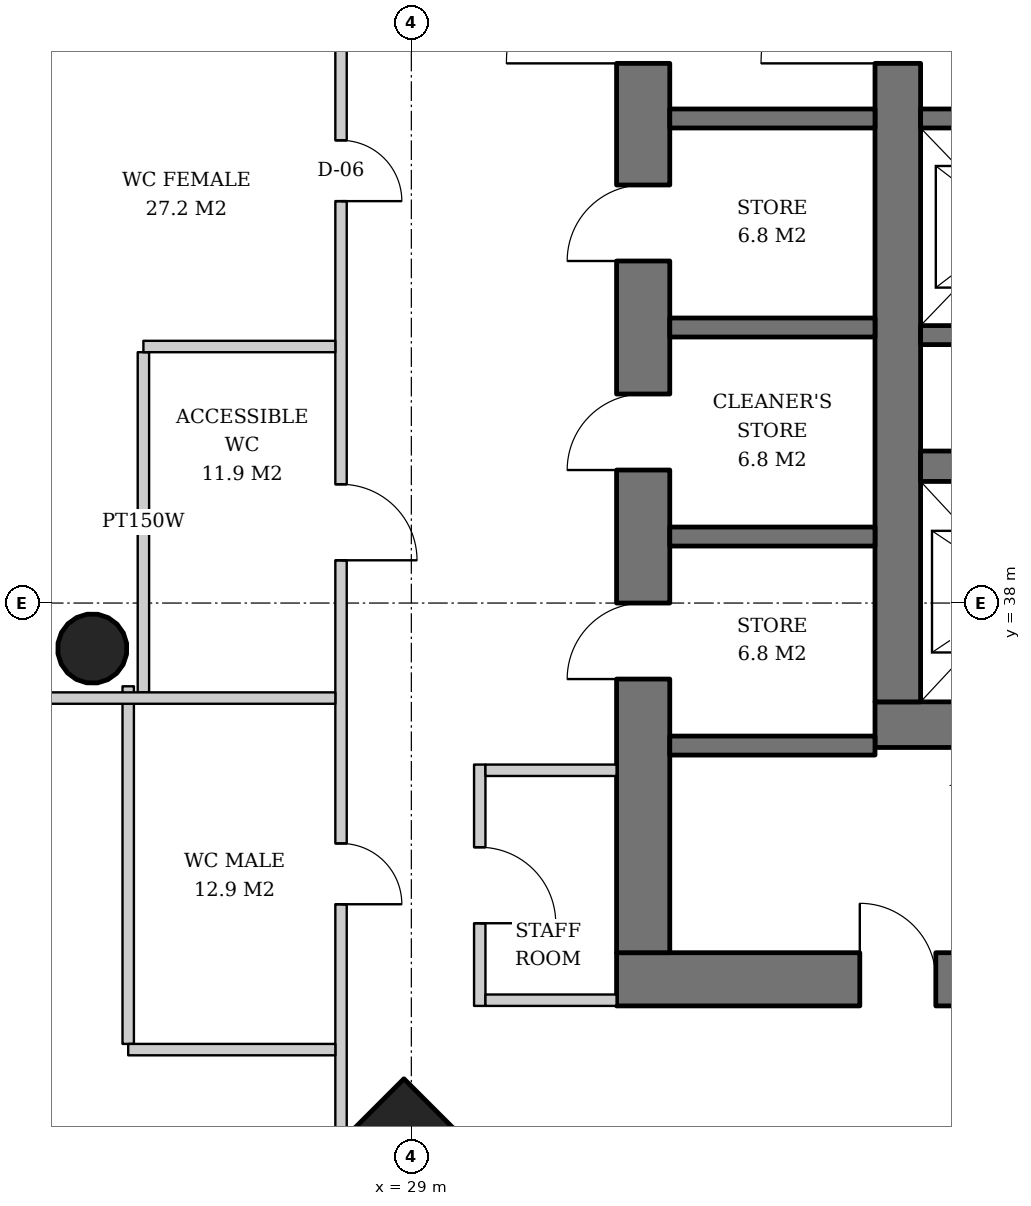
"""IFC4 building model, lengths in metres.
Left out: names, types, materials, properties, quantities, classifications, styles, units other than length and angle.
Written with IfcOpenShell. Run it as: python <this file> out.ifc"""

import sys

from ifc_helpers import new_model, si_unit, direction, frame, frame_2d, origin, origin_2d, place, context, subcontext, project, spatial, rectangle, hollow_circle, extrude, element, fill, save


model = new_model("IFC4")
c1 = context("Model", 3, precision=1e-05, world=origin(), true_north=direction((0.0, 1.0)))
c2 = subcontext(c1, "Body", "Model", "MODEL_VIEW")
j1 = project(units=[si_unit("LENGTHUNIT", "METRE"), si_unit("PLANEANGLEUNIT", "RADIAN")], contexts=[c1])
p1 = place(None, origin())
s1 = spatial("IfcSite", under=j1, at=p1, CompositionType="ELEMENT")
p2 = place(p1, origin())
s2 = spatial("IfcBuilding", under=s1, at=p2, CompositionType="ELEMENT")
p3 = place(p2, frame((0.0, 0.0, 138.8)))
s3 = spatial("IfcBuildingStorey", under=s2, at=p3, CompositionType="ELEMENT", Elevation=138.8)
p4 = place(p3, frame((28.864, 29.864, 0.0), z_axis=(0.031898107953, 0.031898107953, 0.998981992539), x_axis=(-0.707106781187, 0.707106781187, 0.0)))
e1 = element("IfcColumn", 1, at=p4, inside=s3, PredefinedType="COLUMN", context=c2, shape_type="SweptSolid", body=[
    extrude(rectangle(XDim=2.6, YDim=2.6, at=origin_2d()), origin(), (0.0, 0.0, 1.0), 3.804),
])
p5 = place(p3, frame((24.764, 37.382, 0.0), z_axis=(0.031910269556, 0.015987237665, 0.999362868496), x_axis=(-0.447933021895, 0.894067115991, 0.0)))
e2 = element("IfcColumn", 2, at=p5, inside=s3, PredefinedType="COLUMN", context=c2, shape_type="SweptSolid", body=[
    extrude(hollow_circle(Radius=0.457, WallThickness=0.03, at=origin_2d()), origin(), (0.0, 0.0, 1.0), 3.802),
])
p6 = place(p3, frame((35.1, 36.4, 0.0), z_axis=(0.0, 0.0, 1.0), x_axis=(1.0, 0.0, 0.0)))
e3 = element("IfcWall", 3, at=p6, inside=s3, PredefinedType="SHEAR", context=c2, shape_type="SweptSolid", body=[
    extrude(rectangle(XDim=19.8, YDim=0.6, at=frame_2d((9.9, 0.0))), origin(), (0.0, 0.0, 1.0), 3.8),
])
p7 = place(p6, frame((3.9, 0.0, 0.0)))
e4 = element("IfcOpeningElement", 4, at=p7, cuts=e3, PredefinedType="OPENING", context=c2, shape_type="SweptSolid", body=[
    extrude(rectangle(XDim=1.0, YDim=2.1, at=frame_2d((0.5, 1.05))), frame((0.0, 0.31, 0.0), z_axis=(0.0, -1.0, 0.0), x_axis=(1.0, 0.0, 0.0)), (0.0, 0.0, 1.0), 0.62),
])
p8 = place(p6, frame((15.35, 0.0, 0.0)))
e5 = element("IfcOpeningElement", 5, at=p8, cuts=e3, PredefinedType="OPENING", context=c2, shape_type="SweptSolid", body=[
    extrude(rectangle(XDim=1.0, YDim=2.1, at=frame_2d((0.5, 1.05))), frame((0.0, 0.31, 0.0), z_axis=(0.0, -1.0, 0.0), x_axis=(1.0, 0.0, 0.0)), (0.0, 0.0, 1.0), 0.62),
])
p9 = place(p3, frame((35.4, 36.7, 0.0), z_axis=(0.0, 0.0, 1.0), x_axis=(0.0, 1.0, 0.0)))
e6 = element("IfcWall", 6, at=p9, inside=s3, PredefinedType="SHEAR", context=c2, shape_type="SweptSolid", body=[
    extrude(rectangle(XDim=18.6, YDim=0.6, at=frame_2d((9.3, 0.0))), origin(), (0.0, 0.0, 1.0), 3.8),
])
p10 = place(p9, frame((8.4, 0.0, 0.0)))
e7 = element("IfcOpeningElement", 7, at=p10, cuts=e6, PredefinedType="OPENING", context=c2, shape_type="SweptSolid", body=[
    extrude(rectangle(XDim=1.8, YDim=2.4, at=frame_2d((0.9, 1.2))), frame((0.0, 0.31, 0.0), z_axis=(0.0, -1.0, 0.0), x_axis=(1.0, 0.0, 0.0)), (0.0, 0.0, 1.0), 0.62),
])
p11 = place(p3, frame((31.7, 33.05, 0.0), z_axis=(0.0, 0.0, 1.0), x_axis=(1.0, 0.0, 0.0)))
e8 = element("IfcWall", 8, at=p11, inside=s3, PredefinedType="SHEAR", context=c2, shape_type="SweptSolid", body=[
    extrude(rectangle(XDim=26.6, YDim=0.7, at=frame_2d((13.3, 0.0))), origin(), (0.0, 0.0, 1.0), 3.8),
])
p12 = place(p11, frame((7.3, 0.0, 0.0)))
e9 = element("IfcOpeningElement", 9, at=p12, cuts=e8, PredefinedType="OPENING", context=c2, shape_type="SweptSolid", body=[
    extrude(rectangle(XDim=1.0, YDim=2.1, at=frame_2d((0.5, 1.05))), frame((0.0, 0.36, 0.0), z_axis=(0.0, -1.0, 0.0), x_axis=(1.0, 0.0, 0.0)), (0.0, 0.0, 1.0), 0.72),
])
p13 = place(p11, frame((18.75, 0.0, 0.0)))
e10 = element("IfcOpeningElement", 10, at=p13, cuts=e8, PredefinedType="OPENING", context=c2, shape_type="SweptSolid", body=[
    extrude(rectangle(XDim=1.0, YDim=2.1, at=frame_2d((0.5, 1.05))), frame((0.0, 0.36, 0.0), z_axis=(0.0, -1.0, 0.0), x_axis=(1.0, 0.0, 0.0)), (0.0, 0.0, 1.0), 0.72),
])
p14 = place(p11, frame((3.2, 0.0, 0.0)))
e11 = element("IfcOpeningElement", 11, at=p14, cuts=e8, PredefinedType="OPENING", context=c2, shape_type="SweptSolid", body=[
    extrude(rectangle(XDim=1.0, YDim=2.1, at=frame_2d((0.5, 1.05))), frame((0.0, 0.36, 0.0), z_axis=(0.0, -1.0, 0.0), x_axis=(1.0, 0.0, 0.0)), (0.0, 0.0, 1.0), 0.72),
])
p15 = place(p11, frame((10.42, 0.0, 0.0)))
e12 = element("IfcOpeningElement", 12, at=p15, cuts=e8, PredefinedType="OPENING", context=c2, shape_type="SweptSolid", body=[
    extrude(rectangle(XDim=1.0, YDim=2.1, at=frame_2d((0.5, 1.05))), frame((0.0, 0.36, 0.0), z_axis=(0.0, -1.0, 0.0), x_axis=(1.0, 0.0, 0.0)), (0.0, 0.0, 1.0), 0.72),
])
p16 = place(p11, frame((14.46, 0.0, 0.0)))
e13 = element("IfcOpeningElement", 13, at=p16, cuts=e8, PredefinedType="OPENING", context=c2, shape_type="SweptSolid", body=[
    extrude(rectangle(XDim=1.0, YDim=2.1, at=frame_2d((0.5, 1.05))), frame((0.0, 0.36, 0.0), z_axis=(0.0, -1.0, 0.0), x_axis=(1.0, 0.0, 0.0)), (0.0, 0.0, 1.0), 0.72),
])
p17 = place(p11, frame((22.5, 0.0, 0.0)))
e14 = element("IfcOpeningElement", 14, at=p17, cuts=e8, PredefinedType="OPENING", context=c2, shape_type="SweptSolid", body=[
    extrude(rectangle(XDim=1.0, YDim=2.1, at=frame_2d((0.5, 1.05))), frame((0.0, 0.36, 0.0), z_axis=(0.0, -1.0, 0.0), x_axis=(1.0, 0.0, 0.0)), (0.0, 0.0, 1.0), 0.72),
])
p18 = place(p3, frame((32.05, 33.4, 0.0), z_axis=(0.0, 0.0, 1.0), x_axis=(0.0, 1.0, 0.0)))
e15 = element("IfcWall", 15, at=p18, inside=s3, PredefinedType="SHEAR", context=c2, shape_type="SweptSolid", body=[
    extrude(rectangle(XDim=25.2, YDim=0.7, at=frame_2d((12.6, 0.0))), origin(), (0.0, 0.0, 1.0), 3.8),
])
p19 = place(p18, frame((11.7, 0.0, 0.0)))
e16 = element("IfcOpeningElement", 16, at=p19, cuts=e15, PredefinedType="OPENING", context=c2, shape_type="SweptSolid", body=[
    extrude(rectangle(XDim=1.8, YDim=2.4, at=frame_2d((0.9, 1.2))), frame((0.0, 0.36, 0.0), z_axis=(0.0, -1.0, 0.0), x_axis=(1.0, 0.0, 0.0)), (0.0, 0.0, 1.0), 0.72),
])
p20 = place(p18, frame((3.6, 0.0, 0.0)))
e17 = element("IfcOpeningElement", 17, at=p20, cuts=e15, PredefinedType="OPENING", context=c2, shape_type="SweptSolid", body=[
    extrude(rectangle(XDim=1.0, YDim=2.1, at=frame_2d((0.5, 1.05))), frame((0.0, 0.36, 0.0), z_axis=(0.0, -1.0, 0.0), x_axis=(1.0, 0.0, 0.0)), (0.0, 0.0, 1.0), 0.72),
])
p21 = place(p18, frame((6.35, 0.0, 0.0)))
e18 = element("IfcOpeningElement", 18, at=p21, cuts=e15, PredefinedType="OPENING", context=c2, shape_type="SweptSolid", body=[
    extrude(rectangle(XDim=1.0, YDim=2.1, at=frame_2d((0.5, 1.05))), frame((0.0, 0.36, 0.0), z_axis=(0.0, -1.0, 0.0), x_axis=(1.0, 0.0, 0.0)), (0.0, 0.0, 1.0), 0.72),
])
p22 = place(p18, frame((9.1, 0.0, 0.0)))
e19 = element("IfcOpeningElement", 19, at=p22, cuts=e15, PredefinedType="OPENING", context=c2, shape_type="SweptSolid", body=[
    extrude(rectangle(XDim=1.0, YDim=2.1, at=frame_2d((0.5, 1.05))), frame((0.0, 0.36, 0.0), z_axis=(0.0, -1.0, 0.0), x_axis=(1.0, 0.0, 0.0)), (0.0, 0.0, 1.0), 0.72),
])
p23 = place(p18, frame((15.1, 0.0, 0.0)))
e20 = element("IfcOpeningElement", 20, at=p23, cuts=e15, PredefinedType="OPENING", context=c2, shape_type="SweptSolid", body=[
    extrude(rectangle(XDim=1.0, YDim=2.1, at=frame_2d((0.5, 1.05))), frame((0.0, 0.36, 0.0), z_axis=(0.0, -1.0, 0.0), x_axis=(1.0, 0.0, 0.0)), (0.0, 0.0, 1.0), 0.72),
])
p24 = place(p18, frame((17.85, 0.0, 0.0)))
e21 = element("IfcOpeningElement", 21, at=p24, cuts=e15, PredefinedType="OPENING", context=c2, shape_type="SweptSolid", body=[
    extrude(rectangle(XDim=1.0, YDim=2.1, at=frame_2d((0.5, 1.05))), frame((0.0, 0.36, 0.0), z_axis=(0.0, -1.0, 0.0), x_axis=(1.0, 0.0, 0.0)), (0.0, 0.0, 1.0), 0.72),
])
p25 = place(p3, frame((35.7, 39.8, 0.0), z_axis=(0.0, 0.0, 1.0), x_axis=(1.0, 0.0, 0.0)))
e22 = element("IfcWall", 22, at=p25, inside=s3, PredefinedType="SHEAR", context=c2, shape_type="SweptSolid", body=[
    extrude(rectangle(XDim=18.6, YDim=0.4, at=frame_2d((9.3, 0.0))), origin(), (0.0, 0.0, 1.0), 3.8),
])
p26 = place(p3, frame((35.7, 41.525, 0.0), z_axis=(0.0, 0.0, 1.0), x_axis=(1.0, 0.0, 0.0)))
e23 = element("IfcWall", 23, at=p26, inside=s3, PredefinedType="SHEAR", context=c2, shape_type="SweptSolid", body=[
    extrude(rectangle(XDim=11.0, YDim=0.25, at=frame_2d((5.5, 0.0))), origin(), (0.0, 0.0, 1.0), 3.8),
])
p27 = place(p3, frame((35.7, 44.375, 0.0), z_axis=(0.0, 0.0, 1.0), x_axis=(1.0, 0.0, 0.0)))
e24 = element("IfcWall", 24, at=p27, inside=s3, PredefinedType="SHEAR", context=c2, shape_type="SweptSolid", body=[
    extrude(rectangle(XDim=12.83, YDim=0.25, at=frame_2d((6.415, 0.0))), origin(), (0.0, 0.0, 1.0), 3.8),
])
p28 = place(p27, frame((0.7, 0.0, 0.0)))
e25 = element("IfcOpeningElement", 25, at=p28, cuts=e24, PredefinedType="OPENING", context=c2, shape_type="SweptSolid", body=[
    extrude(rectangle(XDim=1.1, YDim=2.2, at=frame_2d((0.55, 1.1))), frame((0.0, 0.135, 0.0), z_axis=(0.0, -1.0, 0.0), x_axis=(1.0, 0.0, 0.0)), (0.0, 0.0, 1.0), 0.27),
])
p29 = place(p27, frame((3.45, 0.0, 0.0)))
e26 = element("IfcOpeningElement", 26, at=p29, cuts=e24, PredefinedType="OPENING", context=c2, shape_type="SweptSolid", body=[
    extrude(rectangle(XDim=1.1, YDim=2.2, at=frame_2d((0.55, 1.1))), frame((0.0, 0.135, 0.0), z_axis=(0.0, -1.0, 0.0), x_axis=(1.0, 0.0, 0.0)), (0.0, 0.0, 1.0), 0.27),
])
p30 = place(p27, frame((6.2, 0.0, 0.0)))
e27 = element("IfcOpeningElement", 27, at=p30, cuts=e24, PredefinedType="OPENING", context=c2, shape_type="SweptSolid", body=[
    extrude(rectangle(XDim=1.1, YDim=2.2, at=frame_2d((0.55, 1.1))), frame((0.0, 0.135, 0.0), z_axis=(0.0, -1.0, 0.0), x_axis=(1.0, 0.0, 0.0)), (0.0, 0.0, 1.0), 0.27),
])
p31 = place(p27, frame((8.95, 0.0, 0.0)))
e28 = element("IfcOpeningElement", 28, at=p31, cuts=e24, PredefinedType="OPENING", context=c2, shape_type="SweptSolid", body=[
    extrude(rectangle(XDim=1.1, YDim=2.2, at=frame_2d((0.55, 1.1))), frame((0.0, 0.135, 0.0), z_axis=(0.0, -1.0, 0.0), x_axis=(1.0, 0.0, 0.0)), (0.0, 0.0, 1.0), 0.27),
])
p32 = place(p27, frame((11.515, 0.0, 0.0)))
e29 = element("IfcOpeningElement", 29, at=p32, cuts=e24, PredefinedType="OPENING", context=c2, shape_type="SweptSolid", body=[
    extrude(rectangle(XDim=0.8, YDim=2.0, at=frame_2d((0.4, 1.0))), frame((0.0, 0.135, 0.0), z_axis=(0.0, -1.0, 0.0), x_axis=(1.0, 0.0, 0.0)), (0.0, 0.0, 1.0), 0.27),
])
for number, where, z_axis, x_axis in (
    (30, (32.4, 36.125, 0.0), (0.0, 0.0, 1.0), (1.0, 0.0, 0.0)),
    (31, (32.4, 38.875, 0.0), (0.0, 0.0, 1.0), (1.0, 0.0, 0.0)),
    (32, (32.4, 41.625, 0.0), (0.0, 0.0, 1.0), (1.0, 0.0, 0.0)),
    (33, (32.4, 44.375, 0.0), (0.0, 0.0, 1.0), (1.0, 0.0, 0.0)),
):
    element("IfcWall", number, at=place(p3, frame(where, z_axis=z_axis, x_axis=x_axis)), inside=s3, PredefinedType="SHEAR", context=c2, shape_type="SweptSolid", body=[
        extrude(rectangle(XDim=2.7, YDim=0.25, at=frame_2d((1.35, 0.0))), origin(), (0.0, 0.0, 1.0), 3.8),
    ])
p33 = place(p3, frame((29.9, 35.875, 0.0), z_axis=(0.0, 0.0, 1.0), x_axis=(0.0, -1.0, 0.0)))
e34 = element("IfcWall", 34, at=p33, inside=s3, PredefinedType="PARTITIONING", context=c2, shape_type="SweptSolid", body=[
    extrude(rectangle(XDim=3.175, YDim=0.15, at=frame_2d((1.587, 0.0))), origin(), (0.0, 0.0, 1.0), 2.806),
])
p34 = place(p33, frame((1.087, 0.0, 0.0)))
e35 = element("IfcOpeningElement", 35, at=p34, cuts=e34, PredefinedType="OPENING", context=c2, shape_type="SweptSolid", body=[
    extrude(rectangle(XDim=1.0, YDim=2.1, at=frame_2d((0.5, 1.05))), frame((0.0, 0.085, 0.0), z_axis=(0.0, -1.0, 0.0), x_axis=(1.0, 0.0, 0.0)), (0.0, 0.0, 1.0), 0.17),
])
for number, where, z_axis, x_axis in (
    (36, (31.7, 35.8, 0.0), (0.0, 0.0, 1.0), (-1.0, 0.0, 0.0)),
    (37, (31.7, 32.775, 0.0), (0.0, 0.0, 1.0), (-1.0, 0.0, 0.0)),
):
    element("IfcWall", number, at=place(p3, frame(where, z_axis=z_axis, x_axis=x_axis)), inside=s3, PredefinedType="PARTITIONING", context=c2, shape_type="SweptSolid", body=[
        extrude(rectangle(XDim=1.725, YDim=0.15, at=frame_2d((0.862, 0.0))), origin(), (0.0, 0.0, 1.0), 3.62),
    ])
p35 = place(p3, frame((25.475, 41.3, 0.0), z_axis=(0.0, 0.0, 1.0), x_axis=(0.0, -1.0, 0.0)))
e38 = element("IfcWall", 38, at=p35, inside=s3, PredefinedType="PARTITIONING", context=c2, shape_type="SweptSolid", body=[
    extrude(rectangle(XDim=4.475, YDim=0.15, at=frame_2d((2.238, 0.0))), origin(), (0.0, 0.0, 1.0), 2.806),
])
p36 = place(p3, frame((25.275, 36.905, 0.0), z_axis=(0.0, 0.0, 1.0), x_axis=(0.0, -1.0, 0.0)))
e39 = element("IfcWall", 39, at=p36, inside=s3, PredefinedType="PARTITIONING", context=c2, shape_type="SweptSolid", body=[
    extrude(rectangle(XDim=4.705, YDim=0.15, at=frame_2d((2.353, 0.0))), origin(), (0.0, 0.0, 1.0), 2.806),
])
p37 = place(p3, frame((28.075, 61.011, 0.0), z_axis=(0.0, 0.0, 1.0), x_axis=(0.0, -1.0, 0.0)))
e40 = element("IfcWall", 40, at=p37, inside=s3, PredefinedType="PARTITIONING", context=c2, shape_type="SweptSolid", body=[
    extrude(rectangle(XDim=30.023, YDim=0.15, at=frame_2d((15.011, 0.0))), origin(), (0.0, 0.0, 1.0), 2.72),
])
p38 = place(p37, frame((2.949, 0.0, 0.0)))
e41 = element("IfcOpeningElement", 41, at=p38, cuts=e40, PredefinedType="OPENING", context=c2, shape_type="SweptSolid", body=[
    extrude(rectangle(XDim=1.0, YDim=2.1, at=frame_2d((0.5, 1.05))), frame((0.0, 0.085, 0.0), z_axis=(0.0, -1.0, 0.0), x_axis=(1.0, 0.0, 0.0)), (0.0, 0.0, 1.0), 0.17),
])
p39 = place(p37, frame((7.574, 0.0, 0.0)))
e42 = element("IfcOpeningElement", 42, at=p39, cuts=e40, PredefinedType="OPENING", context=c2, shape_type="SweptSolid", body=[
    extrude(rectangle(XDim=1.0, YDim=2.1, at=frame_2d((0.5, 1.05))), frame((0.0, 0.085, 0.0), z_axis=(0.0, -1.0, 0.0), x_axis=(1.0, 0.0, 0.0)), (0.0, 0.0, 1.0), 0.17),
])
p40 = place(p37, frame((12.199, 0.0, 0.0)))
e43 = element("IfcOpeningElement", 43, at=p40, cuts=e40, PredefinedType="OPENING", context=c2, shape_type="SweptSolid", body=[
    extrude(rectangle(XDim=1.0, YDim=2.1, at=frame_2d((0.5, 1.05))), frame((0.0, 0.085, 0.0), z_axis=(0.0, -1.0, 0.0), x_axis=(1.0, 0.0, 0.0)), (0.0, 0.0, 1.0), 0.17),
])
p41 = place(p37, frame((16.924, 0.0, 0.0)))
e44 = element("IfcOpeningElement", 44, at=p41, cuts=e40, PredefinedType="OPENING", context=c2, shape_type="SweptSolid", body=[
    extrude(rectangle(XDim=0.8, YDim=2.1, at=frame_2d((0.4, 1.05))), frame((0.0, 0.085, 0.0), z_axis=(0.0, -1.0, 0.0), x_axis=(1.0, 0.0, 0.0)), (0.0, 0.0, 1.0), 0.17),
])
p42 = place(p37, frame((21.449, 0.0, 0.0)))
e45 = element("IfcOpeningElement", 45, at=p42, cuts=e40, PredefinedType="OPENING", context=c2, shape_type="SweptSolid", body=[
    extrude(rectangle(XDim=1.0, YDim=2.1, at=frame_2d((0.5, 1.05))), frame((0.0, 0.085, 0.0), z_axis=(0.0, -1.0, 0.0), x_axis=(1.0, 0.0, 0.0)), (0.0, 0.0, 1.0), 0.17),
])
p43 = place(p37, frame((26.174, 0.0, 0.0)))
e46 = element("IfcOpeningElement", 46, at=p43, cuts=e40, PredefinedType="OPENING", context=c2, shape_type="SweptSolid", body=[
    extrude(rectangle(XDim=0.8, YDim=2.1, at=frame_2d((0.4, 1.05))), frame((0.0, 0.085, 0.0), z_axis=(0.0, -1.0, 0.0), x_axis=(1.0, 0.0, 0.0)), (0.0, 0.0, 1.0), 0.17),
])
p44 = place(p3, frame((28.0, 41.375, 0.0), z_axis=(0.0, 0.0, 1.0), x_axis=(-1.0, 0.0, 0.0)))
e47 = element("IfcWall", 47, at=p44, inside=s3, PredefinedType="PARTITIONING", context=c2, shape_type="SweptSolid", body=[
    extrude(rectangle(XDim=2.525, YDim=0.15, at=frame_2d((1.262, 0.0))), origin(), (0.0, 0.0, 1.0), 3.62),
])
p45 = place(p3, frame((28.0, 36.75, 0.0), z_axis=(0.0, 0.0, 1.0), x_axis=(-1.0, 0.0, 0.0)))
e48 = element("IfcWall", 48, at=p45, inside=s3, PredefinedType="PARTITIONING", context=c2, shape_type="SweptSolid", body=[
    extrude(rectangle(XDim=4.54, YDim=0.15, at=frame_2d((2.27, 0.0))), origin(), (0.0, 0.0, 1.0), 2.82),
])
p46 = place(p3, frame((28.0, 32.125, 0.0), z_axis=(0.0, 0.0, 1.0), x_axis=(-1.0, 0.0, 0.0)))
e49 = element("IfcWall", 49, at=p46, inside=s3, PredefinedType="PARTITIONING", context=c2, shape_type="SweptSolid", body=[
    extrude(rectangle(XDim=2.725, YDim=0.15, at=frame_2d((1.363, 0.0))), origin(), (0.0, 0.0, 1.0), 3.62),
])
p47 = place(p10, origin())
e50 = element("IfcDoor", 50, at=p47, inside=s3, OperationType="DOUBLE_DOOR_SINGLE_SWING", PredefinedType="DOOR", context=c2, shape_type="SweptSolid", body=[
    extrude(rectangle(XDim=1.8, YDim=2.4, at=frame_2d((0.9, 1.2))), frame((0.0, 0.025, 0.0), z_axis=(0.0, -1.0, 0.0), x_axis=(1.0, 0.0, 0.0)), (0.0, 0.0, 1.0), 0.05),
])
fill(e7, e50)
p48 = place(p19, origin())
e51 = element("IfcDoor", 51, at=p48, inside=s3, OperationType="DOUBLE_DOOR_SINGLE_SWING", PredefinedType="DOOR", context=c2, shape_type="SweptSolid", body=[
    extrude(rectangle(XDim=1.8, YDim=2.4, at=frame_2d((0.9, 1.2))), frame((0.0, 0.025, 0.0), z_axis=(0.0, -1.0, 0.0), x_axis=(1.0, 0.0, 0.0)), (0.0, 0.0, 1.0), 0.05),
])
fill(e16, e51)
p49 = place(p20, origin())
e52 = element("IfcDoor", 52, at=p49, inside=s3, OperationType="SINGLE_SWING_LEFT", PredefinedType="DOOR", context=c2, shape_type="SweptSolid", body=[
    extrude(rectangle(XDim=1.0, YDim=2.1, at=frame_2d((0.5, 1.05))), frame((0.0, -0.29, 0.0), z_axis=(0.0, -1.0, 0.0), x_axis=(1.0, 0.0, 0.0)), (0.0, 0.0, 1.0), 0.05),
])
fill(e17, e52)
p50 = place(p21, origin())
e53 = element("IfcDoor", 53, at=p50, inside=s3, OperationType="SINGLE_SWING_LEFT", PredefinedType="DOOR", context=c2, shape_type="SweptSolid", body=[
    extrude(rectangle(XDim=1.0, YDim=2.1, at=frame_2d((0.5, 1.05))), frame((0.0, -0.29, 0.0), z_axis=(0.0, -1.0, 0.0), x_axis=(1.0, 0.0, 0.0)), (0.0, 0.0, 1.0), 0.05),
])
fill(e18, e53)
p51 = place(p22, origin())
e54 = element("IfcDoor", 54, at=p51, inside=s3, OperationType="SINGLE_SWING_LEFT", PredefinedType="DOOR", context=c2, shape_type="SweptSolid", body=[
    extrude(rectangle(XDim=1.0, YDim=2.1, at=frame_2d((0.5, 1.05))), frame((0.0, -0.29, 0.0), z_axis=(0.0, -1.0, 0.0), x_axis=(1.0, 0.0, 0.0)), (0.0, 0.0, 1.0), 0.05),
])
fill(e19, e54)
p52 = place(p14, origin())
e55 = element("IfcDoor", 55, at=p52, inside=s3, OperationType="SINGLE_SWING_LEFT", PredefinedType="DOOR", context=c2, shape_type="SweptSolid", body=[
    extrude(rectangle(XDim=1.0, YDim=2.1, at=frame_2d((0.5, 1.05))), frame((0.0, 0.34, 0.0), z_axis=(0.0, -1.0, 0.0), x_axis=(1.0, 0.0, 0.0)), (0.0, 0.0, 1.0), 0.05),
])
fill(e11, e55)
p53 = place(p34, origin())
e56 = element("IfcDoor", 56, at=p53, inside=s3, OperationType="SINGLE_SWING_RIGHT", PredefinedType="DOOR", context=c2, shape_type="SweptSolid", body=[
    extrude(rectangle(XDim=1.0, YDim=2.1, at=frame_2d((0.5, 1.05))), frame((0.0, 0.025, 0.0), z_axis=(0.0, -1.0, 0.0), x_axis=(1.0, 0.0, 0.0)), (0.0, 0.0, 1.0), 0.05),
])
fill(e35, e56)
p54 = place(p41, origin())
e57 = element("IfcDoor", 57, at=p54, inside=s3, OperationType="SINGLE_SWING_RIGHT", PredefinedType="DOOR", context=c2, shape_type="SweptSolid", body=[
    extrude(rectangle(XDim=0.8, YDim=2.1, at=frame_2d((0.4, 1.05))), frame((0.0, 0.025, 0.0), z_axis=(0.0, -1.0, 0.0), x_axis=(1.0, 0.0, 0.0)), (0.0, 0.0, 1.0), 0.05),
])
fill(e44, e57)
p55 = place(p42, origin())
e58 = element("IfcDoor", 58, at=p55, inside=s3, OperationType="SINGLE_SWING_RIGHT", PredefinedType="DOOR", context=c2, shape_type="SweptSolid", body=[
    extrude(rectangle(XDim=1.0, YDim=2.1, at=frame_2d((0.5, 1.05))), frame((0.0, 0.025, 0.0), z_axis=(0.0, -1.0, 0.0), x_axis=(1.0, 0.0, 0.0)), (0.0, 0.0, 1.0), 0.05),
])
fill(e45, e58)
p56 = place(p43, origin())
e59 = element("IfcDoor", 59, at=p56, inside=s3, OperationType="SINGLE_SWING_RIGHT", PredefinedType="DOOR", context=c2, shape_type="SweptSolid", body=[
    extrude(rectangle(XDim=0.8, YDim=2.1, at=frame_2d((0.4, 1.05))), frame((0.0, 0.025, 0.0), z_axis=(0.0, -1.0, 0.0), x_axis=(1.0, 0.0, 0.0)), (0.0, 0.0, 1.0), 0.05),
])
fill(e46, e59)
save(model, sys.argv[1])
